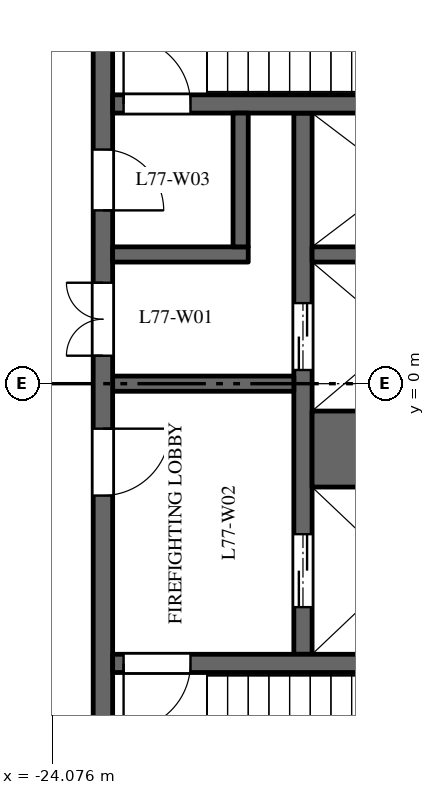
"""IFC4 building model, lengths in metres.
Left out: names, types, materials, properties, quantities, classifications, styles, units other than length and angle.
Written with IfcOpenShell. Run it as: python <this file> out.ifc"""

import sys

from ifc_helpers import new_model, si_unit, direction, frame, frame_2d, origin, origin_2d, place, context, subcontext, project, spatial, rectangle, extrude, element, fill, save


model = new_model("IFC4")
c1 = context("Model", 3, precision=1e-05, world=origin(), true_north=direction((0.0, 1.0)))
c2 = subcontext(c1, "Body", "Model", "MODEL_VIEW")
j1 = project(units=[si_unit("LENGTHUNIT", "METRE"), si_unit("PLANEANGLEUNIT", "RADIAN")], contexts=[c1])
p1 = place(None, origin())
s1 = spatial("IfcSite", under=j1, at=p1, CompositionType="ELEMENT")
p2 = place(p1, origin())
s2 = spatial("IfcBuilding", under=s1, at=p2, CompositionType="ELEMENT")
p3 = place(p2, frame((0.0, 0.0, 351.0)))
s3 = spatial("IfcBuildingStorey", under=s2, at=p3, CompositionType="ELEMENT", Elevation=351.0)
p4 = place(p3, frame((-25.682, 5.672, 0.058), z_axis=(0.281200724754, -0.092390850742, 0.955191123858), x_axis=(0.312142088562, 0.950035429102, 0.0)))
e1 = element("IfcColumn", 1, at=p4, inside=s3, PredefinedType="COLUMN", context=c2, shape_type="SweptSolid", body=[
    extrude(rectangle(XDim=0.85, YDim=0.85, at=origin_2d()), origin(), (0.0, 0.0, 1.0), 5.697),
])
p5 = place(p3, frame((-26.605, 2.884, 0.024), z_axis=(0.663002424258, -0.107229988497, 0.740897776346), x_axis=(0.159659238674, 0.987172187365, 0.0)))
e2 = element("IfcColumn", 2, at=p5, inside=s3, PredefinedType="COLUMN", context=c2, shape_type="SweptSolid", body=[
    extrude(rectangle(XDim=0.85, YDim=0.85, at=origin_2d()), origin(), (0.0, 0.0, 1.0), 7.39),
])
p6 = place(p3, frame((-26.922, 0.0, 0.024), z_axis=(0.671748348073, 0.0, 0.740779425242), x_axis=(0.0, 1.0, 0.0)))
e3 = element("IfcColumn", 3, at=p6, inside=s3, PredefinedType="COLUMN", context=c2, shape_type="SweptSolid", body=[
    extrude(rectangle(XDim=0.85, YDim=0.85, at=origin_2d()), origin(), (0.0, 0.0, 1.0), 7.392),
])
p7 = place(p3, frame((-26.605, -2.884, 0.024), z_axis=(0.663002424258, 0.107229988497, 0.740897776346), x_axis=(-0.159659238674, 0.987172187365, 0.0)))
e4 = element("IfcColumn", 4, at=p7, inside=s3, PredefinedType="COLUMN", context=c2, shape_type="SweptSolid", body=[
    extrude(rectangle(XDim=0.85, YDim=0.85, at=origin_2d()), origin(), (0.0, 0.0, 1.0), 7.39),
])
p8 = place(p3, frame((-25.682, -5.672, 0.058), z_axis=(0.281200724754, 0.092390850742, 0.955191123858), x_axis=(-0.312142088562, 0.950035429102, 0.0)))
e5 = element("IfcColumn", 5, at=p8, inside=s3, PredefinedType="COLUMN", context=c2, shape_type="SweptSolid", body=[
    extrude(rectangle(XDim=0.85, YDim=0.85, at=origin_2d()), origin(), (0.0, 0.0, 1.0), 5.697),
])
p9 = place(p3, frame((-19.95, -4.45, 0.0), z_axis=(0.0, 0.0, 1.0), x_axis=(0.0, 1.0, 0.0)))
e6 = element("IfcWall", 6, at=p9, inside=s3, PredefinedType="SHEAR", context=c2, shape_type="SweptSolid", body=[
    extrude(rectangle(XDim=8.9, YDim=0.3, at=frame_2d((4.45, 0.0))), origin(), (0.0, 0.0, 1.0), 5.3),
])
p10 = place(p9, frame((0.775, 0.0, 0.0)))
e7 = element("IfcOpeningElement", 7, at=p10, cuts=e6, PredefinedType="OPENING", context=c2, shape_type="SweptSolid", body=[
    extrude(rectangle(XDim=1.2, YDim=2.1, at=frame_2d((0.6, 1.05))), frame((0.0, 0.16, 0.0), z_axis=(0.0, -1.0, 0.0), x_axis=(1.0, 0.0, 0.0)), (0.0, 0.0, 1.0), 0.32),
])
p11 = place(p9, frame((4.675, 0.0, 0.0)))
e8 = element("IfcOpeningElement", 8, at=p11, cuts=e6, PredefinedType="OPENING", context=c2, shape_type="SweptSolid", body=[
    extrude(rectangle(XDim=1.1, YDim=2.1, at=frame_2d((0.55, 1.05))), frame((0.0, 0.16, 0.0), z_axis=(0.0, -1.0, 0.0), x_axis=(1.0, 0.0, 0.0)), (0.0, 0.0, 1.0), 0.32),
])
p12 = place(p3, frame((-20.1, 0.0, 0.0), z_axis=(0.0, 0.0, 1.0), x_axis=(-1.0, 0.0, 0.0)))
e9 = element("IfcWall", 9, at=p12, inside=s3, PredefinedType="SHEAR", context=c2, shape_type="SweptSolid", body=[
    extrude(rectangle(XDim=2.98, YDim=0.25, at=frame_2d((1.49, 0.0))), origin(), (0.0, 0.0, 1.0), 5.3),
])
p13 = place(p3, frame((-23.24, -8.0, 0.0), z_axis=(0.0, 0.0, 1.0), x_axis=(0.0, 1.0, 0.0)))
e10 = element("IfcWall", 10, at=p13, inside=s3, PredefinedType="SHEAR", context=c2, shape_type="SweptSolid", body=[
    extrude(rectangle(XDim=16.0, YDim=0.32, at=frame_2d((8.0, 0.0))), origin(), (0.0, 0.0, 1.0), 5.3),
])
p14 = place(p13, frame((6.16, 0.0, 0.0)))
e11 = element("IfcOpeningElement", 11, at=p14, cuts=e10, PredefinedType="OPENING", context=c2, shape_type="SweptSolid", body=[
    extrude(rectangle(XDim=1.1, YDim=2.1, at=frame_2d((0.55, 1.05))), frame((0.0, 0.17, 0.0), z_axis=(0.0, -1.0, 0.0), x_axis=(1.0, 0.0, 0.0)), (0.0, 0.0, 1.0), 0.34),
])
p15 = place(p13, frame((10.85, 0.0, 0.0)))
e12 = element("IfcOpeningElement", 12, at=p15, cuts=e10, PredefinedType="OPENING", context=c2, shape_type="SweptSolid", body=[
    extrude(rectangle(XDim=1.0, YDim=2.1, at=frame_2d((0.5, 1.05))), frame((0.0, 0.17, 0.0), z_axis=(0.0, -1.0, 0.0), x_axis=(1.0, 0.0, 0.0)), (0.0, 0.0, 1.0), 0.34),
])
p16 = place(p13, frame((8.46, 0.0, 0.0)))
e13 = element("IfcOpeningElement", 13, at=p16, cuts=e10, PredefinedType="OPENING", context=c2, shape_type="SweptSolid", body=[
    extrude(rectangle(XDim=1.2, YDim=2.1, at=frame_2d((0.6, 1.05))), frame((0.0, 0.17, 0.0), z_axis=(0.0, -1.0, 0.0), x_axis=(1.0, 0.0, 0.0)), (0.0, 0.0, 1.0), 0.34),
])
p17 = place(p3, frame((-16.9, -1.075, 0.0), z_axis=(0.0, 0.0, 1.0), x_axis=(-1.0, 0.0, 0.0)))
e14 = element("IfcWall", 14, at=p17, inside=s3, PredefinedType="SHEAR", context=c2, shape_type="SweptSolid", body=[
    extrude(rectangle(XDim=2.9, YDim=1.25, at=frame_2d((1.45, 0.0))), origin(), (0.0, 0.0, 1.0), 5.3),
])
p18 = place(p3, frame((-16.9, 2.125, 0.0), z_axis=(0.0, 0.0, 1.0), x_axis=(-1.0, 0.0, 0.0)))
e15 = element("IfcWall", 15, at=p18, inside=s3, PredefinedType="SHEAR", context=c2, shape_type="SweptSolid", body=[
    extrude(rectangle(XDim=2.9, YDim=0.25, at=frame_2d((1.45, 0.0))), origin(), (0.0, 0.0, 1.0), 5.3),
])
p19 = place(p3, frame((-16.9, 4.6, 0.0), z_axis=(0.0, 0.0, 1.0), x_axis=(-1.0, 0.0, 0.0)))
e16 = element("IfcWall", 16, at=p19, inside=s3, PredefinedType="SHEAR", context=c2, shape_type="SweptSolid", body=[
    extrude(rectangle(XDim=6.18, YDim=0.3, at=frame_2d((3.09, 0.0))), origin(), (0.0, 0.0, 1.0), 5.3),
])
p20 = place(p19, frame((4.9, 0.0, 0.0)))
e17 = element("IfcOpeningElement", 17, at=p20, cuts=e16, PredefinedType="OPENING", context=c2, shape_type="SweptSolid", body=[
    extrude(rectangle(XDim=1.1, YDim=2.1, at=frame_2d((0.55, 1.05))), frame((0.0, 0.16, 0.0), z_axis=(0.0, -1.0, 0.0), x_axis=(1.0, 0.0, 0.0)), (0.0, 0.0, 1.0), 0.32),
])
p21 = place(p3, frame((-16.9, -4.6, 0.0), z_axis=(0.0, 0.0, 1.0), x_axis=(-1.0, 0.0, 0.0)))
e18 = element("IfcWall", 18, at=p21, inside=s3, PredefinedType="SHEAR", context=c2, shape_type="SweptSolid", body=[
    extrude(rectangle(XDim=6.18, YDim=0.3, at=frame_2d((3.09, 0.0))), origin(), (0.0, 0.0, 1.0), 5.3),
])
p22 = place(p21, frame((4.9, 0.0, 0.0)))
e19 = element("IfcOpeningElement", 19, at=p22, cuts=e18, PredefinedType="OPENING", context=c2, shape_type="SweptSolid", body=[
    extrude(rectangle(XDim=1.1, YDim=2.1, at=frame_2d((0.55, 1.05))), frame((0.0, 0.16, 0.0), z_axis=(0.0, -1.0, 0.0), x_axis=(1.0, 0.0, 0.0)), (0.0, 0.0, 1.0), 0.32),
])
p23 = place(p3, frame((-20.85, 2.125, 0.0), z_axis=(0.0, 0.0, 1.0), x_axis=(-1.0, 0.0, 0.0)))
e20 = element("IfcWall", 20, at=p23, inside=s3, PredefinedType="SHEAR", context=c2, shape_type="SweptSolid", body=[
    extrude(rectangle(XDim=2.23, YDim=0.25, at=frame_2d((1.115, 0.0))), origin(), (0.0, 0.0, 1.0), 5.3),
])
p24 = place(p3, frame((-20.975, 2.25, 0.0), z_axis=(0.0, 0.0, 1.0), x_axis=(0.0, 1.0, 0.0)))
e21 = element("IfcWall", 21, at=p24, inside=s3, PredefinedType="SHEAR", context=c2, shape_type="SweptSolid", body=[
    extrude(rectangle(XDim=2.2, YDim=0.25, at=frame_2d((1.1, 0.0))), origin(), (0.0, 0.0, 1.0), 5.3),
])
p25 = place(p10, origin())
e22 = element("IfcDoor", 22, at=p25, inside=s3, OperationType="DOUBLE_DOOR_SLIDING", PredefinedType="DOOR", context=c2, shape_type="SweptSolid", body=[
    extrude(rectangle(XDim=1.2, YDim=2.1, at=frame_2d((0.6, 1.05))), frame((0.0, 0.025, 0.0), z_axis=(0.0, -1.0, 0.0), x_axis=(1.0, 0.0, 0.0)), (0.0, 0.0, 1.0), 0.05),
])
fill(e7, e22)
p26 = place(p11, origin())
e23 = element("IfcDoor", 23, at=p26, inside=s3, OperationType="DOUBLE_DOOR_SLIDING", PredefinedType="DOOR", context=c2, shape_type="SweptSolid", body=[
    extrude(rectangle(XDim=1.1, YDim=2.1, at=frame_2d((0.55, 1.05))), frame((0.0, 0.025, 0.0), z_axis=(0.0, -1.0, 0.0), x_axis=(1.0, 0.0, 0.0)), (0.0, 0.0, 1.0), 0.05),
])
fill(e8, e23)
p27 = place(p20, origin())
e24 = element("IfcDoor", 24, at=p27, inside=s3, OperationType="SINGLE_SWING_RIGHT", PredefinedType="DOOR", context=c2, shape_type="SweptSolid", body=[
    extrude(rectangle(XDim=1.1, YDim=2.1, at=frame_2d((0.55, 1.05))), frame((0.0, 0.025, 0.0), z_axis=(0.0, -1.0, 0.0), x_axis=(1.0, 0.0, 0.0)), (0.0, 0.0, 1.0), 0.05),
])
fill(e17, e24)
p28 = place(p22, origin())
e25 = element("IfcDoor", 25, at=p28, inside=s3, OperationType="SINGLE_SWING_LEFT", PredefinedType="DOOR", context=c2, shape_type="SweptSolid", body=[
    extrude(rectangle(XDim=1.1, YDim=2.1, at=frame_2d((0.55, 1.05))), frame((0.0, 0.025, 0.0), z_axis=(0.0, -1.0, 0.0), x_axis=(1.0, 0.0, 0.0)), (0.0, 0.0, 1.0), 0.05),
])
fill(e19, e25)
p29 = place(p14, origin())
e26 = element("IfcDoor", 26, at=p29, inside=s3, OperationType="SINGLE_SWING_RIGHT", PredefinedType="DOOR", context=c2, shape_type="SweptSolid", body=[
    extrude(rectangle(XDim=1.1, YDim=2.1, at=frame_2d((0.55, 1.05))), frame((0.0, 0.025, 0.0), z_axis=(0.0, -1.0, 0.0), x_axis=(1.0, 0.0, 0.0)), (0.0, 0.0, 1.0), 0.05),
])
fill(e11, e26)
p30 = place(p15, origin())
e27 = element("IfcDoor", 27, at=p30, inside=s3, OperationType="SINGLE_SWING_LEFT", PredefinedType="DOOR", context=c2, shape_type="SweptSolid", body=[
    extrude(rectangle(XDim=1.0, YDim=2.1, at=frame_2d((0.5, 1.05))), frame((0.0, 0.025, 0.0), z_axis=(0.0, -1.0, 0.0), x_axis=(1.0, 0.0, 0.0)), (0.0, 0.0, 1.0), 0.05),
])
fill(e12, e27)
p31 = place(p16, origin())
e28 = element("IfcDoor", 28, at=p31, inside=s3, OperationType="DOUBLE_DOOR_DOUBLE_SWING", PredefinedType="DOOR", context=c2, shape_type="SweptSolid", body=[
    extrude(rectangle(XDim=1.2, YDim=2.1, at=frame_2d((0.6, 1.05))), frame((0.0, 0.025, 0.0), z_axis=(0.0, -1.0, 0.0), x_axis=(1.0, 0.0, 0.0)), (0.0, 0.0, 1.0), 0.05),
])
fill(e13, e28)
save(model, sys.argv[1])
